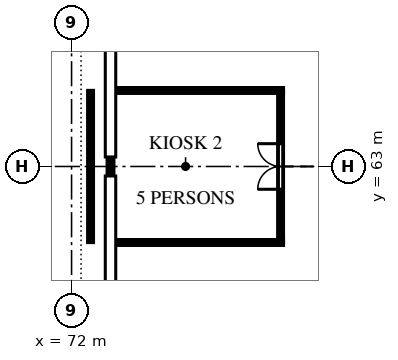
"""IFC4 building model, lengths in metres.
Left out: names, types, materials, properties, quantities, classifications, styles, units other than length and angle.
Written with IfcOpenShell. Run it as: python <this file> out.ifc"""

import sys

from ifc_helpers import new_model, si_unit, direction, frame, frame_2d, origin, place, context, subcontext, project, spatial, polyline, rectangle, outline, extrude, element, fill, save


model = new_model("IFC4")
c1 = context("Model", 3, precision=1e-05, world=origin(), true_north=direction((0.0, 1.0)))
c2 = subcontext(c1, "Body", "Model", "MODEL_VIEW")
j1 = project(units=[si_unit("LENGTHUNIT", "METRE"), si_unit("PLANEANGLEUNIT", "RADIAN")], contexts=[c1])
p1 = place(None, origin())
s1 = spatial("IfcSite", under=j1, at=p1, CompositionType="ELEMENT")
p2 = place(p1, origin())
s2 = spatial("IfcBuilding", under=s1, at=p2, CompositionType="ELEMENT")
p3 = place(p2, frame((0.0, 0.0, 7.5)))
s3 = spatial("IfcBuildingStorey", under=s2, at=p3, CompositionType="ELEMENT", Elevation=7.5)
p4 = place(p3, frame((73.025, 62.75, 0.0), z_axis=(0.0, 0.0, 1.0), x_axis=(0.0, 1.0, 0.0)))
e1 = element("IfcWall", 1, at=p4, inside=s3, PredefinedType="SOLIDWALL", context=c2, shape_type="SweptSolid", body=[
    extrude(rectangle(XDim=0.5, YDim=0.1, at=frame_2d((0.25, 0.0))), origin(), (0.0, 0.0, 1.0), 3.288),
])
p5 = place(p3, frame((73.125, 61.0, 0.0), z_axis=(0.0, 0.0, 1.0), x_axis=(1.0, 0.0, 0.0)))
e2 = element("IfcWall", 2, at=p5, inside=s3, PredefinedType="PARTITIONING", context=c2, shape_type="SweptSolid", body=[
    extrude(rectangle(XDim=4.413, YDim=0.075, at=frame_2d((2.206, 0.0))), origin(), (0.0, 0.0, 1.0), 3.287),
])
p6 = place(p3, frame((77.5, 61.038, 0.0), z_axis=(0.0, 0.0, 1.0), x_axis=(0.0, 1.0, 0.0)))
e3 = element("IfcWall", 3, at=p6, inside=s3, PredefinedType="PARTITIONING", context=c2, shape_type="SweptSolid", body=[
    extrude(rectangle(XDim=3.925, YDim=0.075, at=frame_2d((1.962, 0.0))), origin(), (0.0, 0.0, 1.0), 3.287),
])
p7 = place(p6, frame((1.363, 0.0, 0.0)))
e4 = element("IfcOpeningElement", 4, at=p7, cuts=e3, PredefinedType="OPENING", context=c2, shape_type="SweptSolid", body=[
    extrude(rectangle(XDim=1.2, YDim=2.1, at=frame_2d((0.6, 1.05))), frame((0.0, 0.047, 0.0), z_axis=(0.0, -1.0, 0.0), x_axis=(1.0, 0.0, 0.0)), (0.0, 0.0, 1.0), 0.095),
])
p8 = place(p3, frame((77.538, 65.0, 0.0), z_axis=(0.0, 0.0, 1.0), x_axis=(-1.0, 0.0, 0.0)))
e5 = element("IfcWall", 5, at=p8, inside=s3, PredefinedType="PARTITIONING", context=c2, shape_type="SweptSolid", body=[
    extrude(rectangle(XDim=4.413, YDim=0.075, at=frame_2d((2.206, 0.0))), origin(), (0.0, 0.0, 1.0), 3.287),
])
p9 = place(p3, frame((72.5, 64.962, 0.0), z_axis=(0.0, 0.0, 1.0), x_axis=(0.0, -1.0, 0.0)))
e6 = element("IfcWall", 6, at=p9, inside=s3, PredefinedType="PARTITIONING", context=c2, shape_type="SweptSolid", body=[
    extrude(rectangle(XDim=3.925, YDim=0.075, at=frame_2d((1.962, 0.0))), origin(), (0.0, 0.0, 1.0), 3.287),
])
p10 = place(p7, origin())
e7 = element("IfcDoor", 7, at=p10, inside=s3, OperationType="DOUBLE_DOOR_SINGLE_SWING", PredefinedType="DOOR", context=c2, shape_type="SweptSolid", body=[
    extrude(outline(polyline([(0.0, 0.0), (0.07, 0.0), (0.07, 2.03), (1.13, 2.03), (1.13, 0.0), (1.2, 0.0), (1.2, 2.1), (0.0, 2.1), (0.0, 0.0)])), frame((0.0, 0.025, 0.0), z_axis=(0.0, -1.0, 0.0), x_axis=(1.0, 0.0, 0.0)), (0.0, 0.0, 1.0), 0.05),
    extrude(outline(polyline([(0.074, 0.01), (0.597, 0.01), (0.597, 2.026), (0.074, 2.026), (0.074, 0.01)]), holes=[polyline([(0.178, 0.373), (0.492, 0.373), (0.492, 1.784), (0.178, 1.784), (0.178, 0.373)])]), frame((0.0, 0.017, 0.0), z_axis=(0.0, -1.0, 0.0), x_axis=(1.0, 0.0, 0.0)), (0.0, 0.0, 1.0), 0.035),
    extrude(rectangle(XDim=0.314, YDim=1.411, at=frame_2d((0.335, 1.079))), frame((0.0, 0.009, 0.0), z_axis=(0.0, -1.0, 0.0), x_axis=(1.0, 0.0, 0.0)), (0.0, 0.0, 1.0), 0.017),
    extrude(outline(polyline([(0.603, 0.01), (1.126, 0.01), (1.126, 2.026), (0.603, 2.026), (0.603, 0.01)]), holes=[polyline([(0.708, 0.373), (1.021, 0.373), (1.021, 1.784), (0.708, 1.784), (0.708, 0.373)])]), frame((0.0, 0.017, 0.0), z_axis=(0.0, -1.0, 0.0), x_axis=(1.0, 0.0, 0.0)), (0.0, 0.0, 1.0), 0.035),
    extrude(rectangle(XDim=0.314, YDim=1.411, at=frame_2d((0.865, 1.079))), frame((0.0, 0.009, 0.0), z_axis=(0.0, -1.0, 0.0), x_axis=(1.0, 0.0, 0.0)), (0.0, 0.0, 1.0), 0.017),
])
fill(e4, e7)
save(model, sys.argv[1])
